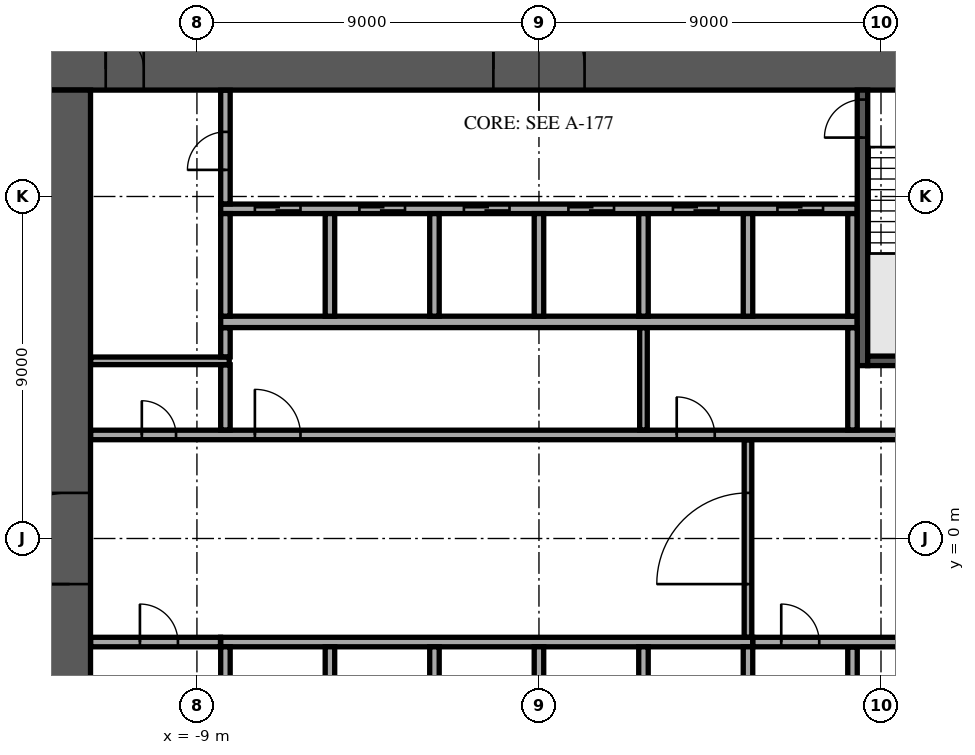
"""IFC4 building model, lengths in metres.
Left out: names, types, materials, properties, quantities, classifications, styles, units other than length and angle.
Written with IfcOpenShell. Run it as: python <this file> out.ifc"""

import sys

from ifc_helpers import new_model, si_unit, direction, frame, frame_2d, origin, place, context, subcontext, project, spatial, rectangle, extrude, element, fill, save


model = new_model("IFC4")
c1 = context("Model", 3, precision=1e-05, world=origin(), true_north=direction((0.0, 1.0)))
c2 = subcontext(c1, "Body", "Model", "MODEL_VIEW")
j1 = project(units=[si_unit("LENGTHUNIT", "METRE"), si_unit("PLANEANGLEUNIT", "RADIAN")], contexts=[c1])
p1 = place(None, origin())
s1 = spatial("IfcSite", under=j1, at=p1, CompositionType="ELEMENT")
p2 = place(p1, origin())
s2 = spatial("IfcBuilding", under=s1, at=p2, CompositionType="ELEMENT")
p3 = place(p2, frame((0.0, 0.0, 90.1)))
s3 = spatial("IfcBuildingStorey", under=s2, at=p3, CompositionType="ELEMENT", Elevation=90.1)
p4 = place(p3, frame((-12.9, 12.35, 0.0), z_axis=(0.0, 0.0, 1.0), x_axis=(1.0, 0.0, 0.0)))
e1 = element("IfcWall", 1, at=p4, inside=s3, PredefinedType="SHEAR", context=c2, shape_type="SweptSolid", body=[
    extrude(rectangle(XDim=25.8, YDim=1.1, at=frame_2d((12.9, 0.0))), origin(), (0.0, 0.0, 1.0), 3.58),
])
p5 = place(p4, frame((11.7, 0.0, 0.0)))
e2 = element("IfcOpeningElement", 2, at=p5, cuts=e1, PredefinedType="OPENING", context=c2, shape_type="SweptSolid", body=[
    extrude(rectangle(XDim=2.4, YDim=2.4, at=frame_2d((1.2, 1.2))), frame((0.0, 0.56, 0.0), z_axis=(0.0, -1.0, 0.0), x_axis=(1.0, 0.0, 0.0)), (0.0, 0.0, 1.0), 1.12),
])
p6 = place(p4, frame((22.525, 0.0, 0.0)))
e3 = element("IfcOpeningElement", 3, at=p6, cuts=e1, PredefinedType="OPENING", context=c2, shape_type="SweptSolid", body=[
    extrude(rectangle(XDim=1.2, YDim=2.1, at=frame_2d((0.6, 1.05))), frame((0.0, 0.56, 0.0), z_axis=(0.0, -1.0, 0.0), x_axis=(1.0, 0.0, 0.0)), (0.0, 0.0, 1.0), 1.12),
])
p7 = place(p4, frame((1.5, 0.0, 0.0)))
e4 = element("IfcOpeningElement", 4, at=p7, cuts=e1, PredefinedType="OPENING", context=c2, shape_type="SweptSolid", body=[
    extrude(rectangle(XDim=1.0, YDim=2.1, at=frame_2d((0.5, 1.05))), frame((0.0, 0.56, 0.0), z_axis=(0.0, -1.0, 0.0), x_axis=(1.0, 0.0, 0.0)), (0.0, 0.0, 1.0), 1.12),
])
p8 = place(p3, frame((-12.35, -11.8, 0.0), z_axis=(0.0, 0.0, 1.0), x_axis=(0.0, 1.0, 0.0)))
e5 = element("IfcWall", 5, at=p8, inside=s3, PredefinedType="SHEAR", context=c2, shape_type="SweptSolid", body=[
    extrude(rectangle(XDim=23.6, YDim=1.1, at=frame_2d((11.8, 0.0))), origin(), (0.0, 0.0, 1.0), 3.58),
])
p9 = place(p8, frame((10.6, 0.0, 0.0)))
e6 = element("IfcOpeningElement", 6, at=p9, cuts=e5, PredefinedType="OPENING", context=c2, shape_type="SweptSolid", body=[
    extrude(rectangle(XDim=2.4, YDim=2.4, at=frame_2d((1.2, 1.2))), frame((0.0, 0.56, 0.0), z_axis=(0.0, -1.0, 0.0), x_axis=(1.0, 0.0, 0.0)), (0.0, 0.0, 1.0), 1.12),
])
p10 = place(p3, frame((-8.375, 5.7, 0.0), z_axis=(0.0, 0.0, 1.0), x_axis=(1.0, 0.0, 0.0)))
e7 = element("IfcWall", 7, at=p10, inside=s3, PredefinedType="SOLIDWALL", context=c2, shape_type="SweptSolid", body=[
    extrude(rectangle(XDim=16.75, YDim=0.3, at=frame_2d((8.375, 0.0))), origin(), (0.0, 0.0, 1.0), 3.58),
])
p11 = place(p3, frame((-8.375, 8.675, 0.0), z_axis=(0.0, 0.0, 1.0), x_axis=(1.0, 0.0, 0.0)))
e8 = element("IfcWall", 8, at=p11, inside=s3, PredefinedType="SOLIDWALL", context=c2, shape_type="SweptSolid", body=[
    extrude(rectangle(XDim=16.75, YDim=0.25, at=frame_2d((8.375, 0.0))), origin(), (0.0, 0.0, 1.0), 3.58),
])
p12 = place(p11, frame((0.9, 0.0, 0.0)))
e9 = element("IfcOpeningElement", 9, at=p12, cuts=e8, PredefinedType="OPENING", context=c2, shape_type="SweptSolid", body=[
    extrude(rectangle(XDim=1.2, YDim=2.1, at=frame_2d((0.6, 1.05))), frame((0.0, 0.135, 0.0), z_axis=(0.0, -1.0, 0.0), x_axis=(1.0, 0.0, 0.0)), (0.0, 0.0, 1.0), 0.27),
])
p13 = place(p11, frame((3.65, 0.0, 0.0)))
e10 = element("IfcOpeningElement", 10, at=p13, cuts=e8, PredefinedType="OPENING", context=c2, shape_type="SweptSolid", body=[
    extrude(rectangle(XDim=1.2, YDim=2.1, at=frame_2d((0.6, 1.05))), frame((0.0, 0.135, 0.0), z_axis=(0.0, -1.0, 0.0), x_axis=(1.0, 0.0, 0.0)), (0.0, 0.0, 1.0), 0.27),
])
p14 = place(p11, frame((6.4, 0.0, 0.0)))
e11 = element("IfcOpeningElement", 11, at=p14, cuts=e8, PredefinedType="OPENING", context=c2, shape_type="SweptSolid", body=[
    extrude(rectangle(XDim=1.2, YDim=2.1, at=frame_2d((0.6, 1.05))), frame((0.0, 0.135, 0.0), z_axis=(0.0, -1.0, 0.0), x_axis=(1.0, 0.0, 0.0)), (0.0, 0.0, 1.0), 0.27),
])
p15 = place(p11, frame((9.15, 0.0, 0.0)))
e12 = element("IfcOpeningElement", 12, at=p15, cuts=e8, PredefinedType="OPENING", context=c2, shape_type="SweptSolid", body=[
    extrude(rectangle(XDim=1.2, YDim=2.1, at=frame_2d((0.6, 1.05))), frame((0.0, 0.135, 0.0), z_axis=(0.0, -1.0, 0.0), x_axis=(1.0, 0.0, 0.0)), (0.0, 0.0, 1.0), 0.27),
])
p16 = place(p11, frame((11.9, 0.0, 0.0)))
e13 = element("IfcOpeningElement", 13, at=p16, cuts=e8, PredefinedType="OPENING", context=c2, shape_type="SweptSolid", body=[
    extrude(rectangle(XDim=1.2, YDim=2.1, at=frame_2d((0.6, 1.05))), frame((0.0, 0.135, 0.0), z_axis=(0.0, -1.0, 0.0), x_axis=(1.0, 0.0, 0.0)), (0.0, 0.0, 1.0), 0.27),
])
p17 = place(p11, frame((14.65, 0.0, 0.0)))
e14 = element("IfcOpeningElement", 14, at=p17, cuts=e8, PredefinedType="OPENING", context=c2, shape_type="SweptSolid", body=[
    extrude(rectangle(XDim=1.2, YDim=2.1, at=frame_2d((0.6, 1.05))), frame((0.0, 0.135, 0.0), z_axis=(0.0, -1.0, 0.0), x_axis=(1.0, 0.0, 0.0)), (0.0, 0.0, 1.0), 0.27),
])
for number, where, z_axis, x_axis in (
    (15, (-8.25, 5.85, 0.0), (0.0, 0.0, 1.0), (0.0, 1.0, 0.0)),
    (16, (-5.5, 5.85, 0.0), (0.0, 0.0, 1.0), (0.0, 1.0, 0.0)),
    (17, (-2.75, 5.85, 0.0), (0.0, 0.0, 1.0), (0.0, 1.0, 0.0)),
    (18, (0.0, 5.85, 0.0), (0.0, 0.0, 1.0), (0.0, 1.0, 0.0)),
    (19, (2.75, 5.85, 0.0), (0.0, 0.0, 1.0), (0.0, 1.0, 0.0)),
    (20, (5.5, 5.85, 0.0), (0.0, 0.0, 1.0), (0.0, 1.0, 0.0)),
    (21, (8.25, 5.85, 0.0), (0.0, 0.0, 1.0), (0.0, 1.0, 0.0)),
):
    element("IfcWall", number, at=place(p3, frame(where, z_axis=z_axis, x_axis=x_axis)), inside=s3, PredefinedType="SOLIDWALL", context=c2, shape_type="SweptSolid", body=[
        extrude(rectangle(XDim=2.7, YDim=0.25, at=frame_2d((1.35, 0.0))), origin(), (0.0, 0.0, 1.0), 3.58),
    ])
p18 = place(p3, frame((-8.375, -2.725, 0.0), z_axis=(0.0, 0.0, 1.0), x_axis=(1.0, 0.0, 0.0)))
e22 = element("IfcWall", 22, at=p18, inside=s3, PredefinedType="SOLIDWALL", context=c2, shape_type="SweptSolid", body=[
    extrude(rectangle(XDim=14.0, YDim=0.25, at=frame_2d((7.0, 0.0))), origin(), (0.0, 0.0, 1.0), 3.58),
])
for number, where, z_axis, x_axis in (
    (23, (-8.25, -5.55, 0.0), (0.0, 0.0, 1.0), (0.0, 1.0, 0.0)),
    (24, (-5.5, -5.55, 0.0), (0.0, 0.0, 1.0), (0.0, 1.0, 0.0)),
    (25, (-2.75, -5.55, 0.0), (0.0, 0.0, 1.0), (0.0, 1.0, 0.0)),
    (26, (0.0, -5.55, 0.0), (0.0, 0.0, 1.0), (0.0, 1.0, 0.0)),
    (27, (2.75, -5.55, 0.0), (0.0, 0.0, 1.0), (0.0, 1.0, 0.0)),
    (28, (5.5, -5.55, 0.0), (0.0, 0.0, 1.0), (0.0, 1.0, 0.0)),
):
    element("IfcWall", number, at=place(p3, frame(where, z_axis=z_axis, x_axis=x_axis)), inside=s3, PredefinedType="SOLIDWALL", context=c2, shape_type="SweptSolid", body=[
        extrude(rectangle(XDim=2.7, YDim=0.25, at=frame_2d((1.35, 0.0))), origin(), (0.0, 0.0, 1.0), 3.58),
    ])
p19 = place(p3, frame((8.512, 4.55, 0.0), z_axis=(0.0, 0.0, 1.0), x_axis=(0.0, 1.0, 0.0)))
e29 = element("IfcWall", 29, at=p19, inside=s3, PredefinedType="SOLIDWALL", context=c2, shape_type="SweptSolid", body=[
    extrude(rectangle(XDim=7.25, YDim=0.275, at=frame_2d((3.625, 0.0))), origin(), (0.0, 0.0, 1.0), 3.58),
])
p20 = place(p19, frame((6.0, 0.0, 0.0)))
e30 = element("IfcOpeningElement", 30, at=p20, cuts=e29, PredefinedType="OPENING", context=c2, shape_type="SweptSolid", body=[
    extrude(rectangle(XDim=1.0, YDim=2.1, at=frame_2d((0.5, 1.05))), frame((0.0, 0.147, 0.0), z_axis=(0.0, -1.0, 0.0), x_axis=(1.0, 0.0, 0.0)), (0.0, 0.0, 1.0), 0.295),
])
p21 = place(p3, frame((8.65, 4.675, 0.0), z_axis=(0.0, 0.0, 1.0), x_axis=(1.0, 0.0, 0.0)))
e31 = element("IfcWall", 31, at=p21, inside=s3, PredefinedType="SOLIDWALL", context=c2, shape_type="SweptSolid", body=[
    extrude(rectangle(XDim=3.15, YDim=0.25, at=frame_2d((1.575, 0.0))), origin(), (0.0, 0.0, 1.0), 3.58),
])
p22 = place(p3, frame((8.25, -5.545, 0.0), z_axis=(0.0, 0.0, 1.0), x_axis=(0.0, 1.0, 0.0)))
e32 = element("IfcWall", 32, at=p22, inside=s3, PredefinedType="PARTITIONING", context=c2, shape_type="SweptSolid", body=[
    extrude(rectangle(XDim=2.69, YDim=0.25, at=frame_2d((1.345, 0.0))), origin(), (0.0, 0.0, 1.0), 3.58),
])
p23 = place(p3, frame((-11.795, -2.725, 0.0), z_axis=(0.0, 0.0, 1.0), x_axis=(1.0, 0.0, 0.0)))
e33 = element("IfcWall", 33, at=p23, inside=s3, PredefinedType="PARTITIONING", context=c2, shape_type="SweptSolid", body=[
    extrude(rectangle(XDim=3.415, YDim=0.25, at=frame_2d((1.708, 0.0))), origin(), (0.0, 0.0, 1.0), 3.58),
])
p24 = place(p23, frame((1.295, 0.0, 0.0)))
e34 = element("IfcOpeningElement", 34, at=p24, cuts=e33, PredefinedType="OPENING", context=c2, shape_type="SweptSolid", body=[
    extrude(rectangle(XDim=1.0, YDim=2.1, at=frame_2d((0.5, 1.05))), frame((0.0, 0.135, 0.0), z_axis=(0.0, -1.0, 0.0), x_axis=(1.0, 0.0, 0.0)), (0.0, 0.0, 1.0), 0.27),
])
p25 = place(p3, frame((5.63, -2.725, 0.0), z_axis=(0.0, 0.0, 1.0), x_axis=(1.0, 0.0, 0.0)))
e35 = element("IfcWall", 35, at=p25, inside=s3, PredefinedType="PARTITIONING", context=c2, shape_type="SweptSolid", body=[
    extrude(rectangle(XDim=6.165, YDim=0.25, at=frame_2d((3.083, 0.0))), origin(), (0.0, 0.0, 1.0), 3.58),
])
p26 = place(p25, frame((0.745, 0.0, 0.0)))
e36 = element("IfcOpeningElement", 36, at=p26, cuts=e35, PredefinedType="OPENING", context=c2, shape_type="SweptSolid", body=[
    extrude(rectangle(XDim=1.0, YDim=2.1, at=frame_2d((0.5, 1.05))), frame((0.0, 0.135, 0.0), z_axis=(0.0, -1.0, 0.0), x_axis=(1.0, 0.0, 0.0)), (0.0, 0.0, 1.0), 0.27),
])
p27 = place(p25, frame((3.92, 0.0, 0.0)))
e37 = element("IfcOpeningElement", 37, at=p27, cuts=e35, PredefinedType="OPENING", context=c2, shape_type="SweptSolid", body=[
    extrude(rectangle(XDim=0.9, YDim=2.1, at=frame_2d((0.45, 1.05))), frame((0.0, 0.135, 0.0), z_axis=(0.0, -1.0, 0.0), x_axis=(1.0, 0.0, 0.0)), (0.0, 0.0, 1.0), 0.27),
])
p28 = place(p3, frame((5.5, -2.595, 0.0), z_axis=(0.0, 0.0, 1.0), x_axis=(0.0, 1.0, 0.0)))
e38 = element("IfcWall", 38, at=p28, inside=s3, PredefinedType="PARTITIONING", context=c2, shape_type="SweptSolid", body=[
    extrude(rectangle(XDim=5.19, YDim=0.2, at=frame_2d((2.595, 0.0))), origin(), (0.0, 0.0, 1.0), 3.58),
])
p29 = place(p28, frame((1.395, 0.0, 0.0)))
e39 = element("IfcOpeningElement", 39, at=p29, cuts=e38, PredefinedType="OPENING", context=c2, shape_type="SweptSolid", body=[
    extrude(rectangle(XDim=2.4, YDim=2.4, at=frame_2d((1.2, 1.2))), frame((0.0, 0.11, 0.0), z_axis=(0.0, -1.0, 0.0), x_axis=(1.0, 0.0, 0.0)), (0.0, 0.0, 1.0), 0.22),
])
p30 = place(p3, frame((-11.795, 2.725, 0.0), z_axis=(0.0, 0.0, 1.0), x_axis=(1.0, 0.0, 0.0)))
e40 = element("IfcWall", 40, at=p30, inside=s3, PredefinedType="PARTITIONING", context=c2, shape_type="SweptSolid", body=[
    extrude(rectangle(XDim=23.59, YDim=0.25, at=frame_2d((11.795, 0.0))), origin(), (0.0, 0.0, 1.0), 3.58),
])
p31 = place(p30, frame((21.345, 0.0, 0.0)))
e41 = element("IfcOpeningElement", 41, at=p31, cuts=e40, PredefinedType="OPENING", context=c2, shape_type="SweptSolid", body=[
    extrude(rectangle(XDim=0.9, YDim=2.1, at=frame_2d((0.45, 1.05))), frame((0.0, 0.135, 0.0), z_axis=(0.0, -1.0, 0.0), x_axis=(1.0, 0.0, 0.0)), (0.0, 0.0, 1.0), 0.27),
])
p32 = place(p30, frame((1.345, 0.0, 0.0)))
e42 = element("IfcOpeningElement", 42, at=p32, cuts=e40, PredefinedType="OPENING", context=c2, shape_type="SweptSolid", body=[
    extrude(rectangle(XDim=0.9, YDim=2.1, at=frame_2d((0.45, 1.05))), frame((0.0, 0.135, 0.0), z_axis=(0.0, -1.0, 0.0), x_axis=(1.0, 0.0, 0.0)), (0.0, 0.0, 1.0), 0.27),
])
p33 = place(p30, frame((4.32, 0.0, 0.0)))
e43 = element("IfcOpeningElement", 43, at=p33, cuts=e40, PredefinedType="OPENING", context=c2, shape_type="SweptSolid", body=[
    extrude(rectangle(XDim=1.2, YDim=2.1, at=frame_2d((0.6, 1.05))), frame((0.0, 0.135, 0.0), z_axis=(0.0, -1.0, 0.0), x_axis=(1.0, 0.0, 0.0)), (0.0, 0.0, 1.0), 0.27),
])
p34 = place(p30, frame((15.42, 0.0, 0.0)))
e44 = element("IfcOpeningElement", 44, at=p34, cuts=e40, PredefinedType="OPENING", context=c2, shape_type="SweptSolid", body=[
    extrude(rectangle(XDim=1.0, YDim=2.1, at=frame_2d((0.5, 1.05))), frame((0.0, 0.135, 0.0), z_axis=(0.0, -1.0, 0.0), x_axis=(1.0, 0.0, 0.0)), (0.0, 0.0, 1.0), 0.27),
])
p35 = place(p3, frame((-8.25, 2.855, 0.0), z_axis=(0.0, 0.0, 1.0), x_axis=(0.0, 1.0, 0.0)))
e45 = element("IfcWall", 45, at=p35, inside=s3, PredefinedType="PARTITIONING", context=c2, shape_type="SweptSolid", body=[
    extrude(rectangle(XDim=1.715, YDim=0.25, at=frame_2d((0.857, 0.0))), origin(), (0.0, 0.0, 1.0), 3.58),
])
p36 = place(p3, frame((2.75, 2.855, 0.0), z_axis=(0.0, 0.0, 1.0), x_axis=(0.0, 1.0, 0.0)))
e46 = element("IfcWall", 46, at=p36, inside=s3, PredefinedType="PARTITIONING", context=c2, shape_type="SweptSolid", body=[
    extrude(rectangle(XDim=2.69, YDim=0.2, at=frame_2d((1.345, 0.0))), origin(), (0.0, 0.0, 1.0), 3.58),
])
p37 = place(p3, frame((8.25, 2.855, 0.0), z_axis=(0.0, 0.0, 1.0), x_axis=(0.0, 1.0, 0.0)))
e47 = element("IfcWall", 47, at=p37, inside=s3, PredefinedType="PARTITIONING", context=c2, shape_type="SweptSolid", body=[
    extrude(rectangle(XDim=2.69, YDim=0.25, at=frame_2d((1.345, 0.0))), origin(), (0.0, 0.0, 1.0), 3.58),
])
p38 = place(p3, frame((-11.795, 4.675, 0.0), z_axis=(0.0, 0.0, 1.0), x_axis=(1.0, 0.0, 0.0)))
e48 = element("IfcWall", 48, at=p38, inside=s3, PredefinedType="PARTITIONING", context=c2, shape_type="SweptSolid", body=[
    extrude(rectangle(XDim=3.645, YDim=0.2, at=frame_2d((1.823, 0.0))), origin(), (0.0, 0.0, 1.0), 3.58),
])
p39 = place(p3, frame((-8.25, 4.78, 0.0), z_axis=(0.0, 0.0, 1.0), x_axis=(0.0, 1.0, 0.0)))
e49 = element("IfcWall", 49, at=p39, inside=s3, PredefinedType="PARTITIONING", context=c2, shape_type="SweptSolid", body=[
    extrude(rectangle(XDim=0.765, YDim=0.25, at=frame_2d((0.382, 0.0))), origin(), (0.0, 0.0, 1.0), 3.58),
])
p40 = place(p3, frame((-8.25, 8.805, 0.0), z_axis=(0.0, 0.0, 1.0), x_axis=(0.0, 1.0, 0.0)))
e50 = element("IfcWall", 50, at=p40, inside=s3, PredefinedType="PARTITIONING", context=c2, shape_type="SweptSolid", body=[
    extrude(rectangle(XDim=2.99, YDim=0.25, at=frame_2d((1.495, 0.0))), origin(), (0.0, 0.0, 1.0), 3.58),
])
p41 = place(p40, frame((0.895, 0.0, 0.0)))
e51 = element("IfcOpeningElement", 51, at=p41, cuts=e50, PredefinedType="OPENING", context=c2, shape_type="SweptSolid", body=[
    extrude(rectangle(XDim=1.0, YDim=2.1, at=frame_2d((0.5, 1.05))), frame((0.0, 0.135, 0.0), z_axis=(0.0, -1.0, 0.0), x_axis=(1.0, 0.0, 0.0)), (0.0, 0.0, 1.0), 0.27),
])
p42 = place(p5, origin())
e52 = element("IfcDoor", 52, at=p42, inside=s3, OperationType="SINGLE_SWING_LEFT", PredefinedType="DOOR", context=c2, shape_type="SweptSolid", body=[
    extrude(rectangle(XDim=2.4, YDim=2.4, at=frame_2d((1.2, 1.2))), frame((0.0, 0.025, 0.0), z_axis=(0.0, -1.0, 0.0), x_axis=(1.0, 0.0, 0.0)), (0.0, 0.0, 1.0), 0.05),
])
fill(e2, e52)
p43 = place(p7, origin())
e53 = element("IfcDoor", 53, at=p43, inside=s3, OperationType="SINGLE_SWING_LEFT", PredefinedType="DOOR", context=c2, shape_type="SweptSolid", body=[
    extrude(rectangle(XDim=1.0, YDim=2.1, at=frame_2d((0.5, 1.05))), frame((0.0, 0.025, 0.0), z_axis=(0.0, -1.0, 0.0), x_axis=(1.0, 0.0, 0.0)), (0.0, 0.0, 1.0), 0.05),
])
fill(e4, e53)
p44 = place(p9, origin())
e54 = element("IfcDoor", 54, at=p44, inside=s3, OperationType="SINGLE_SWING_LEFT", PredefinedType="DOOR", context=c2, shape_type="SweptSolid", body=[
    extrude(rectangle(XDim=2.4, YDim=2.4, at=frame_2d((1.2, 1.2))), frame((0.0, 0.025, 0.0), z_axis=(0.0, -1.0, 0.0), x_axis=(1.0, 0.0, 0.0)), (0.0, 0.0, 1.0), 0.05),
])
fill(e6, e54)
p45 = place(p12, origin())
e55 = element("IfcDoor", 55, at=p45, inside=s3, OperationType="DOUBLE_DOOR_SLIDING", PredefinedType="DOOR", context=c2, shape_type="SweptSolid", body=[
    extrude(rectangle(XDim=1.2, YDim=2.1, at=frame_2d((0.6, 1.05))), frame((0.0, 0.025, 0.0), z_axis=(0.0, -1.0, 0.0), x_axis=(1.0, 0.0, 0.0)), (0.0, 0.0, 1.0), 0.05),
])
fill(e9, e55)
p46 = place(p13, origin())
e56 = element("IfcDoor", 56, at=p46, inside=s3, OperationType="DOUBLE_DOOR_SLIDING", PredefinedType="DOOR", context=c2, shape_type="SweptSolid", body=[
    extrude(rectangle(XDim=1.2, YDim=2.1, at=frame_2d((0.6, 1.05))), frame((0.0, 0.025, 0.0), z_axis=(0.0, -1.0, 0.0), x_axis=(1.0, 0.0, 0.0)), (0.0, 0.0, 1.0), 0.05),
])
fill(e10, e56)
p47 = place(p14, origin())
e57 = element("IfcDoor", 57, at=p47, inside=s3, OperationType="DOUBLE_DOOR_SLIDING", PredefinedType="DOOR", context=c2, shape_type="SweptSolid", body=[
    extrude(rectangle(XDim=1.2, YDim=2.1, at=frame_2d((0.6, 1.05))), frame((0.0, 0.025, 0.0), z_axis=(0.0, -1.0, 0.0), x_axis=(1.0, 0.0, 0.0)), (0.0, 0.0, 1.0), 0.05),
])
fill(e11, e57)
p48 = place(p15, origin())
e58 = element("IfcDoor", 58, at=p48, inside=s3, OperationType="DOUBLE_DOOR_SLIDING", PredefinedType="DOOR", context=c2, shape_type="SweptSolid", body=[
    extrude(rectangle(XDim=1.2, YDim=2.1, at=frame_2d((0.6, 1.05))), frame((0.0, 0.025, 0.0), z_axis=(0.0, -1.0, 0.0), x_axis=(1.0, 0.0, 0.0)), (0.0, 0.0, 1.0), 0.05),
])
fill(e12, e58)
p49 = place(p16, origin())
e59 = element("IfcDoor", 59, at=p49, inside=s3, OperationType="DOUBLE_DOOR_SLIDING", PredefinedType="DOOR", context=c2, shape_type="SweptSolid", body=[
    extrude(rectangle(XDim=1.2, YDim=2.1, at=frame_2d((0.6, 1.05))), frame((0.0, 0.025, 0.0), z_axis=(0.0, -1.0, 0.0), x_axis=(1.0, 0.0, 0.0)), (0.0, 0.0, 1.0), 0.05),
])
fill(e13, e59)
p50 = place(p17, origin())
e60 = element("IfcDoor", 60, at=p50, inside=s3, OperationType="DOUBLE_DOOR_SLIDING", PredefinedType="DOOR", context=c2, shape_type="SweptSolid", body=[
    extrude(rectangle(XDim=1.2, YDim=2.1, at=frame_2d((0.6, 1.05))), frame((0.0, 0.025, 0.0), z_axis=(0.0, -1.0, 0.0), x_axis=(1.0, 0.0, 0.0)), (0.0, 0.0, 1.0), 0.05),
])
fill(e14, e60)
p51 = place(p20, origin())
e61 = element("IfcDoor", 61, at=p51, inside=s3, OperationType="SINGLE_SWING_LEFT", PredefinedType="DOOR", context=c2, shape_type="SweptSolid", body=[
    extrude(rectangle(XDim=1.0, YDim=2.1, at=frame_2d((0.5, 1.05))), frame((0.0, 0.025, 0.0), z_axis=(0.0, -1.0, 0.0), x_axis=(1.0, 0.0, 0.0)), (0.0, 0.0, 1.0), 0.05),
])
fill(e30, e61)
p52 = place(p24, origin())
e62 = element("IfcDoor", 62, at=p52, inside=s3, OperationType="SINGLE_SWING_LEFT", PredefinedType="DOOR", context=c2, shape_type="SweptSolid", body=[
    extrude(rectangle(XDim=1.0, YDim=2.1, at=frame_2d((0.5, 1.05))), frame((0.0, 0.025, 0.0), z_axis=(0.0, -1.0, 0.0), x_axis=(1.0, 0.0, 0.0)), (0.0, 0.0, 1.0), 0.05),
])
fill(e34, e62)
p53 = place(p26, origin())
e63 = element("IfcDoor", 63, at=p53, inside=s3, OperationType="SINGLE_SWING_LEFT", PredefinedType="DOOR", context=c2, shape_type="SweptSolid", body=[
    extrude(rectangle(XDim=1.0, YDim=2.1, at=frame_2d((0.5, 1.05))), frame((0.0, 0.025, 0.0), z_axis=(0.0, -1.0, 0.0), x_axis=(1.0, 0.0, 0.0)), (0.0, 0.0, 1.0), 0.05),
])
fill(e36, e63)
p54 = place(p32, origin())
e64 = element("IfcDoor", 64, at=p54, inside=s3, OperationType="SINGLE_SWING_LEFT", PredefinedType="DOOR", context=c2, shape_type="SweptSolid", body=[
    extrude(rectangle(XDim=0.9, YDim=2.1, at=frame_2d((0.45, 1.05))), frame((0.0, 0.025, 0.0), z_axis=(0.0, -1.0, 0.0), x_axis=(1.0, 0.0, 0.0)), (0.0, 0.0, 1.0), 0.05),
])
fill(e42, e64)
p55 = place(p41, origin())
e65 = element("IfcDoor", 65, at=p55, inside=s3, OperationType="SINGLE_SWING_LEFT", PredefinedType="DOOR", context=c2, shape_type="SweptSolid", body=[
    extrude(rectangle(XDim=1.0, YDim=2.1, at=frame_2d((0.5, 1.05))), frame((0.0, 0.025, 0.0), z_axis=(0.0, -1.0, 0.0), x_axis=(1.0, 0.0, 0.0)), (0.0, 0.0, 1.0), 0.05),
])
fill(e51, e65)
p56 = place(p33, origin())
e66 = element("IfcDoor", 66, at=p56, inside=s3, OperationType="SINGLE_SWING_LEFT", PredefinedType="DOOR", context=c2, shape_type="SweptSolid", body=[
    extrude(rectangle(XDim=1.2, YDim=2.1, at=frame_2d((0.6, 1.05))), frame((0.0, 0.025, 0.0), z_axis=(0.0, -1.0, 0.0), x_axis=(1.0, 0.0, 0.0)), (0.0, 0.0, 1.0), 0.05),
])
fill(e43, e66)
p57 = place(p34, origin())
e67 = element("IfcDoor", 67, at=p57, inside=s3, OperationType="SINGLE_SWING_LEFT", PredefinedType="DOOR", context=c2, shape_type="SweptSolid", body=[
    extrude(rectangle(XDim=1.0, YDim=2.1, at=frame_2d((0.5, 1.05))), frame((0.0, 0.025, 0.0), z_axis=(0.0, -1.0, 0.0), x_axis=(1.0, 0.0, 0.0)), (0.0, 0.0, 1.0), 0.05),
])
fill(e44, e67)
p58 = place(p29, origin())
e68 = element("IfcDoor", 68, at=p58, inside=s3, OperationType="SINGLE_SWING_LEFT", PredefinedType="DOOR", context=c2, shape_type="SweptSolid", body=[
    extrude(rectangle(XDim=2.4, YDim=2.4, at=frame_2d((1.2, 1.2))), frame((0.0, 0.025, 0.0), z_axis=(0.0, -1.0, 0.0), x_axis=(1.0, 0.0, 0.0)), (0.0, 0.0, 1.0), 0.05),
])
fill(e39, e68)
save(model, sys.argv[1])
